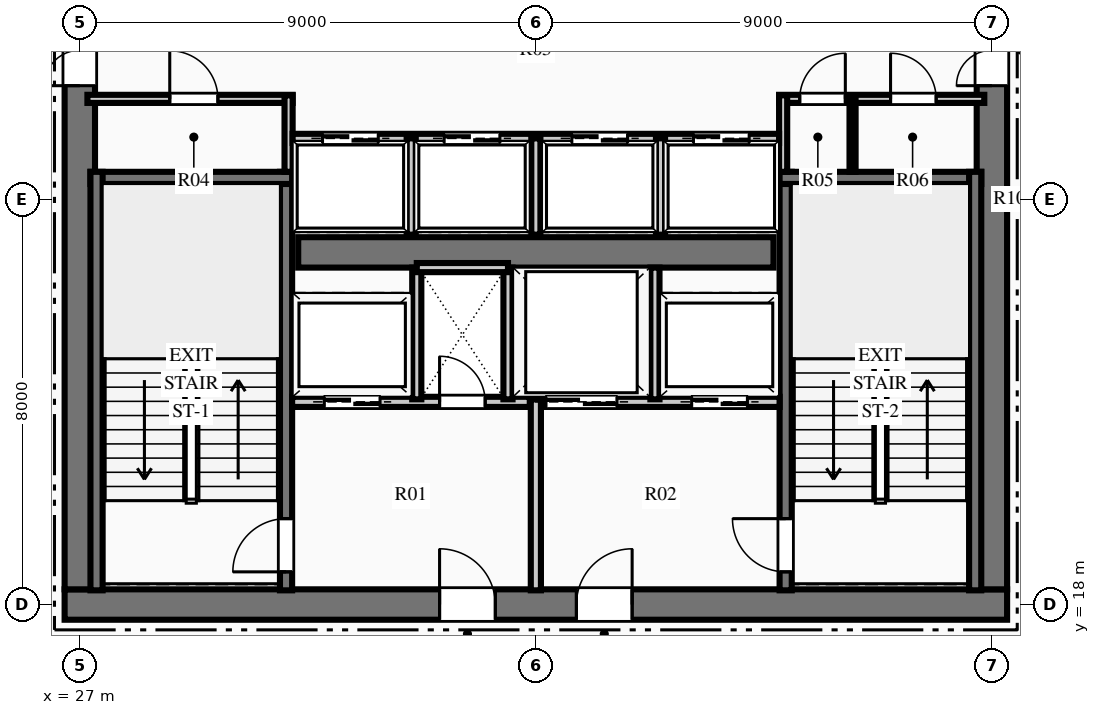
"""IFC4 building model, lengths in metres.
Left out: names, types, materials, properties, quantities, classifications, styles, units other than length and angle.
Written with IfcOpenShell. Run it as: python <this file> out.ifc"""

import sys

from ifc_helpers import new_model, si_unit, direction, frame, frame_2d, origin, place, context, subcontext, project, spatial, rectangle, extrude, element, fill, save


model = new_model("IFC4")
c1 = context("Model", 3, precision=1e-05, world=origin(), true_north=direction((0.0, 1.0)))
c2 = subcontext(c1, "Body", "Model", "MODEL_VIEW")
j1 = project(units=[si_unit("LENGTHUNIT", "METRE"), si_unit("PLANEANGLEUNIT", "RADIAN")], contexts=[c1])
p1 = place(None, origin())
s1 = spatial("IfcSite", under=j1, at=p1, CompositionType="ELEMENT")
p2 = place(p1, origin())
s2 = spatial("IfcBuilding", under=s1, at=p2, CompositionType="ELEMENT")
p3 = place(p2, frame((0.0, 0.0, 55.2)))
s3 = spatial("IfcBuildingStorey", under=s2, at=p3, CompositionType="ELEMENT", Elevation=55.2)
p4 = place(p3, frame((26.7, 18.0, 0.0), z_axis=(0.0, 0.0, 1.0), x_axis=(1.0, 0.0, 0.0)))
e1 = element("IfcWall", 1, at=p4, inside=s3, PredefinedType="SHEAR", context=c2, shape_type="SweptSolid", body=[
    extrude(rectangle(XDim=18.6, YDim=0.6, at=frame_2d((9.3, 0.0))), origin(), (0.0, 0.0, 1.0), 3.75),
])
p5 = place(p4, frame((7.4, 0.0, 0.0)))
e2 = element("IfcOpeningElement", 2, at=p5, cuts=e1, PredefinedType="OPENING", context=c2, shape_type="SweptSolid", body=[
    extrude(rectangle(XDim=1.1, YDim=2.15, at=frame_2d((0.55, 1.075))), frame((0.0, 0.31, 0.0), z_axis=(0.0, -1.0, 0.0), x_axis=(1.0, 0.0, 0.0)), (0.0, 0.0, 1.0), 0.62),
])
p6 = place(p4, frame((10.1, 0.0, 0.0)))
e3 = element("IfcOpeningElement", 3, at=p6, cuts=e1, PredefinedType="OPENING", context=c2, shape_type="SweptSolid", body=[
    extrude(rectangle(XDim=1.1, YDim=2.15, at=frame_2d((0.55, 1.075))), frame((0.0, 0.31, 0.0), z_axis=(0.0, -1.0, 0.0), x_axis=(1.0, 0.0, 0.0)), (0.0, 0.0, 1.0), 0.62),
])
p7 = place(p3, frame((27.0, 18.3, 0.0), z_axis=(0.0, 0.0, 1.0), x_axis=(0.0, 1.0, 0.0)))
e4 = element("IfcWall", 4, at=p7, inside=s3, PredefinedType="SHEAR", context=c2, shape_type="SweptSolid", body=[
    extrude(rectangle(XDim=15.4, YDim=0.6, at=frame_2d((7.7, 0.0))), origin(), (0.0, 0.0, 1.0), 3.75),
])
p8 = place(p7, frame((9.94, 0.0, 0.0)))
e5 = element("IfcOpeningElement", 5, at=p8, cuts=e4, PredefinedType="OPENING", context=c2, shape_type="SweptSolid", body=[
    extrude(rectangle(XDim=1.4, YDim=2.2, at=frame_2d((0.7, 1.1))), frame((0.0, 0.31, 0.0), z_axis=(0.0, -1.0, 0.0), x_axis=(1.0, 0.0, 0.0)), (0.0, 0.0, 1.0), 0.62),
])
p9 = place(p3, frame((45.0, 18.3, 0.0), z_axis=(0.0, 0.0, 1.0), x_axis=(0.0, 1.0, 0.0)))
e6 = element("IfcWall", 6, at=p9, inside=s3, PredefinedType="SHEAR", context=c2, shape_type="SweptSolid", body=[
    extrude(rectangle(XDim=15.4, YDim=0.6, at=frame_2d((7.7, 0.0))), origin(), (0.0, 0.0, 1.0), 3.75),
])
p10 = place(p9, frame((9.94, 0.0, 0.0)))
e7 = element("IfcOpeningElement", 7, at=p10, cuts=e6, PredefinedType="OPENING", context=c2, shape_type="SweptSolid", body=[
    extrude(rectangle(XDim=1.4, YDim=2.2, at=frame_2d((0.7, 1.1))), frame((0.0, 0.31, 0.0), z_axis=(0.0, -1.0, 0.0), x_axis=(1.0, 0.0, 0.0)), (0.0, 0.0, 1.0), 0.62),
])
p11 = place(p3, frame((31.31, 24.95, 0.0), z_axis=(0.0, 0.0, 1.0), x_axis=(1.0, 0.0, 0.0)))
e8 = element("IfcWall", 8, at=p11, inside=s3, PredefinedType="SHEAR", context=c2, shape_type="SweptSolid", body=[
    extrude(rectangle(XDim=9.38, YDim=0.6, at=frame_2d((4.69, 0.0))), origin(), (0.0, 0.0, 1.0), 3.75),
])
p12 = place(p3, frame((31.07, 18.28, 0.0), z_axis=(0.0, 0.0, 1.0), x_axis=(0.0, 1.0, 0.0)))
e9 = element("IfcWall", 9, at=p12, inside=s3, PredefinedType="SHEAR", context=c2, shape_type="SweptSolid", body=[
    extrude(rectangle(XDim=8.26, YDim=0.24, at=frame_2d((4.13, 0.0))), origin(), (0.0, 0.0, 1.0), 3.75),
])
p13 = place(p12, frame((0.365, 0.0, 0.0)))
e10 = element("IfcOpeningElement", 10, at=p13, cuts=e9, PredefinedType="OPENING", context=c2, shape_type="SweptSolid", body=[
    extrude(rectangle(XDim=1.05, YDim=2.15, at=frame_2d((0.525, 1.075))), frame((0.0, 0.13, 0.0), z_axis=(0.0, -1.0, 0.0), x_axis=(1.0, 0.0, 0.0)), (0.0, 0.0, 1.0), 0.26),
])
p14 = place(p3, frame((27.21, 26.42, 0.0), z_axis=(0.0, 0.0, 1.0), x_axis=(1.0, 0.0, 0.0)))
e11 = element("IfcWall", 11, at=p14, inside=s3, PredefinedType="SHEAR", context=c2, shape_type="SweptSolid", body=[
    extrude(rectangle(XDim=3.98, YDim=0.24, at=frame_2d((1.99, 0.0))), origin(), (0.0, 0.0, 1.0), 3.75),
])
p15 = place(p3, frame((27.33, 18.28, 0.0), z_axis=(0.0, 0.0, 1.0), x_axis=(0.0, 1.0, 0.0)))
e12 = element("IfcWall", 12, at=p15, inside=s3, PredefinedType="SHEAR", context=c2, shape_type="SweptSolid", body=[
    extrude(rectangle(XDim=8.26, YDim=0.24, at=frame_2d((4.13, 0.0))), origin(), (0.0, 0.0, 1.0), 3.75),
])
p16 = place(p3, frame((40.93, 18.28, 0.0), z_axis=(0.0, 0.0, 1.0), x_axis=(0.0, 1.0, 0.0)))
e13 = element("IfcWall", 13, at=p16, inside=s3, PredefinedType="SHEAR", context=c2, shape_type="SweptSolid", body=[
    extrude(rectangle(XDim=8.26, YDim=0.24, at=frame_2d((4.13, 0.0))), origin(), (0.0, 0.0, 1.0), 3.75),
])
p17 = place(p16, frame((0.365, 0.0, 0.0)))
e14 = element("IfcOpeningElement", 14, at=p17, cuts=e13, PredefinedType="OPENING", context=c2, shape_type="SweptSolid", body=[
    extrude(rectangle(XDim=1.05, YDim=2.15, at=frame_2d((0.525, 1.075))), frame((0.0, 0.13, 0.0), z_axis=(0.0, -1.0, 0.0), x_axis=(1.0, 0.0, 0.0)), (0.0, 0.0, 1.0), 0.26),
])
p18 = place(p3, frame((40.81, 26.42, 0.0), z_axis=(0.0, 0.0, 1.0), x_axis=(1.0, 0.0, 0.0)))
e15 = element("IfcWall", 15, at=p18, inside=s3, PredefinedType="SHEAR", context=c2, shape_type="SweptSolid", body=[
    extrude(rectangle(XDim=3.98, YDim=0.24, at=frame_2d((1.99, 0.0))), origin(), (0.0, 0.0, 1.0), 3.75),
])
p19 = place(p3, frame((44.67, 18.28, 0.0), z_axis=(0.0, 0.0, 1.0), x_axis=(0.0, 1.0, 0.0)))
e16 = element("IfcWall", 16, at=p19, inside=s3, PredefinedType="SHEAR", context=c2, shape_type="SweptSolid", body=[
    extrude(rectangle(XDim=8.26, YDim=0.24, at=frame_2d((4.13, 0.0))), origin(), (0.0, 0.0, 1.0), 3.75),
])
p20 = place(p3, frame((36.0, 18.28, 0.0), z_axis=(0.0, 0.0, 1.0), x_axis=(0.0, 1.0, 0.0)))
e17 = element("IfcWall", 17, at=p20, inside=s3, PredefinedType="PARTITIONING", context=c2, shape_type="SweptSolid", body=[
    extrude(rectangle(XDim=3.77, YDim=0.2, at=frame_2d((1.885, 0.0))), origin(), (0.0, 0.0, 1.0), 3.44),
])
p21 = place(p3, frame((31.19, 22.0, 0.0), z_axis=(0.0, 0.0, 1.0), x_axis=(1.0, 0.0, 0.0)))
e18 = element("IfcWall", 18, at=p21, inside=s3, PredefinedType="PARTITIONING", context=c2, shape_type="SweptSolid", body=[
    extrude(rectangle(XDim=4.69, YDim=0.2, at=frame_2d((2.345, 0.0))), origin(), (0.0, 0.0, 1.0), 3.44),
])
p22 = place(p21, frame((2.91, 0.0, 0.0)))
e19 = element("IfcOpeningElement", 19, at=p22, cuts=e18, PredefinedType="OPENING", context=c2, shape_type="SweptSolid", body=[
    extrude(rectangle(XDim=0.9, YDim=2.15, at=frame_2d((0.45, 1.075))), frame((0.0, 0.11, 0.0), z_axis=(0.0, -1.0, 0.0), x_axis=(1.0, 0.0, 0.0)), (0.0, 0.0, 1.0), 0.22),
])
p23 = place(p21, frame((0.635, 0.0, 0.0)))
e20 = element("IfcOpeningElement", 20, at=p23, cuts=e18, PredefinedType="OPENING", context=c2, shape_type="SweptSolid", body=[
    extrude(rectangle(XDim=1.1, YDim=2.15, at=frame_2d((0.55, 1.075))), frame((0.0, 0.11, 0.0), z_axis=(0.0, -1.0, 0.0), x_axis=(1.0, 0.0, 0.0)), (0.0, 0.0, 1.0), 0.22),
])
p24 = place(p3, frame((36.12, 22.0, 0.0), z_axis=(0.0, 0.0, 1.0), x_axis=(1.0, 0.0, 0.0)))
e21 = element("IfcWall", 21, at=p24, inside=s3, PredefinedType="PARTITIONING", context=c2, shape_type="SweptSolid", body=[
    extrude(rectangle(XDim=4.69, YDim=0.2, at=frame_2d((2.345, 0.0))), origin(), (0.0, 0.0, 1.0), 3.44),
])
p25 = place(p24, frame((2.955, 0.0, 0.0)))
e22 = element("IfcOpeningElement", 22, at=p25, cuts=e21, PredefinedType="OPENING", context=c2, shape_type="SweptSolid", body=[
    extrude(rectangle(XDim=1.1, YDim=2.15, at=frame_2d((0.55, 1.075))), frame((0.0, 0.11, 0.0), z_axis=(0.0, -1.0, 0.0), x_axis=(1.0, 0.0, 0.0)), (0.0, 0.0, 1.0), 0.22),
])
p26 = place(p24, frame((0.08, 0.0, 0.0)))
e23 = element("IfcOpeningElement", 23, at=p26, cuts=e21, PredefinedType="OPENING", context=c2, shape_type="SweptSolid", body=[
    extrude(rectangle(XDim=1.4, YDim=2.2, at=frame_2d((0.7, 1.1))), frame((0.0, 0.11, 0.0), z_axis=(0.0, -1.0, 0.0), x_axis=(1.0, 0.0, 0.0)), (0.0, 0.0, 1.0), 0.22),
])
for number, where, z_axis, x_axis in (
    (24, (33.65, 22.05, 0.0), (0.0, 0.0, 1.0), (0.0, 1.0, 0.0)),
    (25, (35.45, 22.05, 0.0), (0.0, 0.0, 1.0), (0.0, 1.0, 0.0)),
):
    element("IfcWall", number, at=place(p3, frame(where, z_axis=z_axis, x_axis=x_axis)), inside=s3, PredefinedType="PARTITIONING", context=c2, shape_type="SweptSolid", body=[
        extrude(rectangle(XDim=2.6, YDim=0.18, at=frame_2d((1.3, 0.0))), origin(), (0.0, 0.0, 1.0), 3.44),
    ])
p27 = place(p3, frame((33.65, 24.65, 0.0), z_axis=(0.0, 0.0, 1.0), x_axis=(1.0, 0.0, 0.0)))
e26 = element("IfcWall", 26, at=p27, inside=s3, PredefinedType="PARTITIONING", context=c2, shape_type="SweptSolid", body=[
    extrude(rectangle(XDim=1.8, YDim=0.18, at=frame_2d((0.9, 0.0))), origin(), (0.0, 0.0, 1.0), 3.44),
])
p28 = place(p3, frame((38.35, 22.05, 0.0), z_axis=(0.0, 0.0, 1.0), x_axis=(0.0, 1.0, 0.0)))
e27 = element("IfcWall", 27, at=p28, inside=s3, PredefinedType="PARTITIONING", context=c2, shape_type="SweptSolid", body=[
    extrude(rectangle(XDim=2.6, YDim=0.18, at=frame_2d((1.3, 0.0))), origin(), (0.0, 0.0, 1.0), 3.44),
])
p29 = place(p3, frame((27.15, 27.98, 0.0), z_axis=(0.0, 0.0, 1.0), x_axis=(1.0, 0.0, 0.0)))
e28 = element("IfcWall", 28, at=p29, inside=s3, PredefinedType="PARTITIONING", context=c2, shape_type="SweptSolid", body=[
    extrude(rectangle(XDim=4.05, YDim=0.16, at=frame_2d((2.025, 0.0))), origin(), (0.0, 0.0, 1.0), 3.44),
])
p30 = place(p29, frame((1.625, 0.0, 0.0)))
e29 = element("IfcOpeningElement", 29, at=p30, cuts=e28, PredefinedType="OPENING", context=c2, shape_type="SweptSolid", body=[
    extrude(rectangle(XDim=0.95, YDim=2.15, at=frame_2d((0.475, 1.075))), frame((0.0, 0.09, 0.0), z_axis=(0.0, -1.0, 0.0), x_axis=(1.0, 0.0, 0.0)), (0.0, 0.0, 1.0), 0.18),
])
p31 = place(p3, frame((31.12, 26.54, 0.0), z_axis=(0.0, 0.0, 1.0), x_axis=(0.0, 1.0, 0.0)))
e30 = element("IfcWall", 30, at=p31, inside=s3, PredefinedType="PARTITIONING", context=c2, shape_type="SweptSolid", body=[
    extrude(rectangle(XDim=1.51, YDim=0.16, at=frame_2d((0.755, 0.0))), origin(), (0.0, 0.0, 1.0), 3.44),
])
p32 = place(p3, frame((40.8, 27.98, 0.0), z_axis=(0.0, 0.0, 1.0), x_axis=(1.0, 0.0, 0.0)))
e31 = element("IfcWall", 31, at=p32, inside=s3, PredefinedType="PARTITIONING", context=c2, shape_type="SweptSolid", body=[
    extrude(rectangle(XDim=4.05, YDim=0.16, at=frame_2d((2.025, 0.0))), origin(), (0.0, 0.0, 1.0), 3.44),
])
p33 = place(p32, frame((0.407, 0.0, 0.0)))
e32 = element("IfcOpeningElement", 32, at=p33, cuts=e31, PredefinedType="OPENING", context=c2, shape_type="SweptSolid", body=[
    extrude(rectangle(XDim=0.9, YDim=2.15, at=frame_2d((0.45, 1.075))), frame((0.0, 0.09, 0.0), z_axis=(0.0, -1.0, 0.0), x_axis=(1.0, 0.0, 0.0)), (0.0, 0.0, 1.0), 0.18),
])
p34 = place(p32, frame((2.2, 0.0, 0.0)))
e33 = element("IfcOpeningElement", 33, at=p34, cuts=e31, PredefinedType="OPENING", context=c2, shape_type="SweptSolid", body=[
    extrude(rectangle(XDim=0.9, YDim=2.15, at=frame_2d((0.45, 1.075))), frame((0.0, 0.09, 0.0), z_axis=(0.0, -1.0, 0.0), x_axis=(1.0, 0.0, 0.0)), (0.0, 0.0, 1.0), 0.18),
])
p35 = place(p3, frame((40.88, 26.54, 0.0), z_axis=(0.0, 0.0, 1.0), x_axis=(0.0, 1.0, 0.0)))
e34 = element("IfcWall", 34, at=p35, inside=s3, PredefinedType="PARTITIONING", context=c2, shape_type="SweptSolid", body=[
    extrude(rectangle(XDim=1.51, YDim=0.16, at=frame_2d((0.755, 0.0))), origin(), (0.0, 0.0, 1.0), 3.44),
])
p36 = place(p3, frame((42.25, 26.54, 0.0), z_axis=(0.0, 0.0, 1.0), x_axis=(0.0, 1.0, 0.0)))
e35 = element("IfcWall", 35, at=p36, inside=s3, PredefinedType="PARTITIONING", context=c2, shape_type="SweptSolid", body=[
    extrude(rectangle(XDim=1.44, YDim=0.12, at=frame_2d((0.72, 0.0))), origin(), (0.0, 0.0, 1.0), 3.44),
])
p37 = place(p3, frame((31.2, 27.2, 0.0), z_axis=(0.0, 0.0, 1.0), x_axis=(1.0, 0.0, 0.0)))
e36 = element("IfcWall", 36, at=p37, inside=s3, PredefinedType="PARTITIONING", context=c2, shape_type="SweptSolid", body=[
    extrude(rectangle(XDim=9.6, YDim=0.18, at=frame_2d((4.8, 0.0))), origin(), (0.0, 0.0, 1.0), 3.44),
])
p38 = place(p37, frame((0.59, 0.0, 0.0)))
e37 = element("IfcOpeningElement", 37, at=p38, cuts=e36, PredefinedType="OPENING", context=c2, shape_type="SweptSolid", body=[
    extrude(rectangle(XDim=1.1, YDim=2.15, at=frame_2d((0.55, 1.075))), frame((0.0, 0.1, 0.0), z_axis=(0.0, -1.0, 0.0), x_axis=(1.0, 0.0, 0.0)), (0.0, 0.0, 1.0), 0.2),
])
p39 = place(p37, frame((2.99, 0.0, 0.0)))
e38 = element("IfcOpeningElement", 38, at=p39, cuts=e36, PredefinedType="OPENING", context=c2, shape_type="SweptSolid", body=[
    extrude(rectangle(XDim=1.1, YDim=2.15, at=frame_2d((0.55, 1.075))), frame((0.0, 0.1, 0.0), z_axis=(0.0, -1.0, 0.0), x_axis=(1.0, 0.0, 0.0)), (0.0, 0.0, 1.0), 0.2),
])
p40 = place(p37, frame((5.51, 0.0, 0.0)))
e39 = element("IfcOpeningElement", 39, at=p40, cuts=e36, PredefinedType="OPENING", context=c2, shape_type="SweptSolid", body=[
    extrude(rectangle(XDim=1.1, YDim=2.15, at=frame_2d((0.55, 1.075))), frame((0.0, 0.1, 0.0), z_axis=(0.0, -1.0, 0.0), x_axis=(1.0, 0.0, 0.0)), (0.0, 0.0, 1.0), 0.2),
])
p41 = place(p37, frame((7.91, 0.0, 0.0)))
e40 = element("IfcOpeningElement", 40, at=p41, cuts=e36, PredefinedType="OPENING", context=c2, shape_type="SweptSolid", body=[
    extrude(rectangle(XDim=1.1, YDim=2.15, at=frame_2d((0.55, 1.075))), frame((0.0, 0.1, 0.0), z_axis=(0.0, -1.0, 0.0), x_axis=(1.0, 0.0, 0.0)), (0.0, 0.0, 1.0), 0.2),
])
for number, where, z_axis, x_axis in (
    (41, (33.54, 25.3, 0.0), (0.0, 0.0, 1.0), (0.0, 1.0, 0.0)),
    (42, (36.0, 25.3, 0.0), (0.0, 0.0, 1.0), (0.0, 1.0, 0.0)),
    (43, (38.46, 25.3, 0.0), (0.0, 0.0, 1.0), (0.0, 1.0, 0.0)),
):
    element("IfcWall", number, at=place(p3, frame(where, z_axis=z_axis, x_axis=x_axis)), inside=s3, PredefinedType="PARTITIONING", context=c2, shape_type="SweptSolid", body=[
        extrude(rectangle(XDim=1.9, YDim=0.18, at=frame_2d((0.95, 0.0))), origin(), (0.0, 0.0, 1.0), 3.44),
    ])
p42 = place(p30, origin())
e44 = element("IfcDoor", 44, at=p42, inside=s3, OperationType="SINGLE_SWING_LEFT", PredefinedType="DOOR", context=c2, shape_type="SweptSolid", body=[
    extrude(rectangle(XDim=0.95, YDim=2.15, at=frame_2d((0.475, 1.075))), frame((0.0, 0.025, 0.0), z_axis=(0.0, -1.0, 0.0), x_axis=(1.0, 0.0, 0.0)), (0.0, 0.0, 1.0), 0.05),
])
fill(e29, e44)
p43 = place(p33, origin())
e45 = element("IfcDoor", 45, at=p43, inside=s3, OperationType="SINGLE_SWING_RIGHT", PredefinedType="DOOR", context=c2, shape_type="SweptSolid", body=[
    extrude(rectangle(XDim=0.9, YDim=2.15, at=frame_2d((0.45, 1.075))), frame((0.0, 0.025, 0.0), z_axis=(0.0, -1.0, 0.0), x_axis=(1.0, 0.0, 0.0)), (0.0, 0.0, 1.0), 0.05),
])
fill(e32, e45)
p44 = place(p34, origin())
e46 = element("IfcDoor", 46, at=p44, inside=s3, OperationType="SINGLE_SWING_LEFT", PredefinedType="DOOR", context=c2, shape_type="SweptSolid", body=[
    extrude(rectangle(XDim=0.9, YDim=2.15, at=frame_2d((0.45, 1.075))), frame((0.0, 0.025, 0.0), z_axis=(0.0, -1.0, 0.0), x_axis=(1.0, 0.0, 0.0)), (0.0, 0.0, 1.0), 0.05),
])
fill(e33, e46)
p45 = place(p13, origin())
e47 = element("IfcDoor", 47, at=p45, inside=s3, OperationType="SINGLE_SWING_LEFT", PredefinedType="DOOR", context=c2, shape_type="SweptSolid", body=[
    extrude(rectangle(XDim=1.05, YDim=2.15, at=frame_2d((0.525, 1.075))), frame((0.0, 0.025, 0.0), z_axis=(0.0, -1.0, 0.0), x_axis=(1.0, 0.0, 0.0)), (0.0, 0.0, 1.0), 0.05),
])
fill(e10, e47)
p46 = place(p17, origin())
e48 = element("IfcDoor", 48, at=p46, inside=s3, OperationType="SINGLE_SWING_RIGHT", PredefinedType="DOOR", context=c2, shape_type="SweptSolid", body=[
    extrude(rectangle(XDim=1.05, YDim=2.15, at=frame_2d((0.525, 1.075))), frame((0.0, 0.025, 0.0), z_axis=(0.0, -1.0, 0.0), x_axis=(1.0, 0.0, 0.0)), (0.0, 0.0, 1.0), 0.05),
])
fill(e14, e48)
p47 = place(p5, origin())
e49 = element("IfcDoor", 49, at=p47, inside=s3, OperationType="SINGLE_SWING_LEFT", PredefinedType="DOOR", context=c2, shape_type="SweptSolid", body=[
    extrude(rectangle(XDim=1.1, YDim=2.15, at=frame_2d((0.55, 1.075))), frame((0.0, 0.025, 0.0), z_axis=(0.0, -1.0, 0.0), x_axis=(1.0, 0.0, 0.0)), (0.0, 0.0, 1.0), 0.05),
])
fill(e2, e49)
p48 = place(p6, origin())
e50 = element("IfcDoor", 50, at=p48, inside=s3, OperationType="SINGLE_SWING_RIGHT", PredefinedType="DOOR", context=c2, shape_type="SweptSolid", body=[
    extrude(rectangle(XDim=1.1, YDim=2.15, at=frame_2d((0.55, 1.075))), frame((0.0, 0.025, 0.0), z_axis=(0.0, -1.0, 0.0), x_axis=(1.0, 0.0, 0.0)), (0.0, 0.0, 1.0), 0.05),
])
fill(e3, e50)
p49 = place(p22, origin())
e51 = element("IfcDoor", 51, at=p49, inside=s3, OperationType="SINGLE_SWING_LEFT", PredefinedType="DOOR", context=c2, shape_type="SweptSolid", body=[
    extrude(rectangle(XDim=0.9, YDim=2.15, at=frame_2d((0.45, 1.075))), frame((0.0, 0.025, 0.0), z_axis=(0.0, -1.0, 0.0), x_axis=(1.0, 0.0, 0.0)), (0.0, 0.0, 1.0), 0.05),
])
fill(e19, e51)
p50 = place(p8, origin())
e52 = element("IfcDoor", 52, at=p50, inside=s3, OperationType="DOUBLE_DOOR_SINGLE_SWING", PredefinedType="DOOR", context=c2, shape_type="SweptSolid", body=[
    extrude(rectangle(XDim=1.4, YDim=2.2, at=frame_2d((0.7, 1.1))), frame((0.0, 0.025, 0.0), z_axis=(0.0, -1.0, 0.0), x_axis=(1.0, 0.0, 0.0)), (0.0, 0.0, 1.0), 0.05),
])
fill(e5, e52)
p51 = place(p10, origin())
e53 = element("IfcDoor", 53, at=p51, inside=s3, OperationType="DOUBLE_DOOR_SINGLE_SWING", PredefinedType="DOOR", context=c2, shape_type="SweptSolid", body=[
    extrude(rectangle(XDim=1.4, YDim=2.2, at=frame_2d((0.7, 1.1))), frame((0.0, 0.025, 0.0), z_axis=(0.0, -1.0, 0.0), x_axis=(1.0, 0.0, 0.0)), (0.0, 0.0, 1.0), 0.05),
])
fill(e7, e53)
p52 = place(p38, origin())
e54 = element("IfcDoor", 54, at=p52, inside=s3, OperationType="SLIDING_TO_LEFT", PredefinedType="DOOR", context=c2, shape_type="SweptSolid", body=[
    extrude(rectangle(XDim=1.1, YDim=2.15, at=frame_2d((0.55, 1.075))), frame((0.0, 0.025, 0.0), z_axis=(0.0, -1.0, 0.0), x_axis=(1.0, 0.0, 0.0)), (0.0, 0.0, 1.0), 0.05),
])
fill(e37, e54)
p53 = place(p39, origin())
e55 = element("IfcDoor", 55, at=p53, inside=s3, OperationType="SLIDING_TO_LEFT", PredefinedType="DOOR", context=c2, shape_type="SweptSolid", body=[
    extrude(rectangle(XDim=1.1, YDim=2.15, at=frame_2d((0.55, 1.075))), frame((0.0, 0.025, 0.0), z_axis=(0.0, -1.0, 0.0), x_axis=(1.0, 0.0, 0.0)), (0.0, 0.0, 1.0), 0.05),
])
fill(e38, e55)
p54 = place(p40, origin())
e56 = element("IfcDoor", 56, at=p54, inside=s3, OperationType="SLIDING_TO_LEFT", PredefinedType="DOOR", context=c2, shape_type="SweptSolid", body=[
    extrude(rectangle(XDim=1.1, YDim=2.15, at=frame_2d((0.55, 1.075))), frame((0.0, 0.025, 0.0), z_axis=(0.0, -1.0, 0.0), x_axis=(1.0, 0.0, 0.0)), (0.0, 0.0, 1.0), 0.05),
])
fill(e39, e56)
p55 = place(p41, origin())
e57 = element("IfcDoor", 57, at=p55, inside=s3, OperationType="SLIDING_TO_LEFT", PredefinedType="DOOR", context=c2, shape_type="SweptSolid", body=[
    extrude(rectangle(XDim=1.1, YDim=2.15, at=frame_2d((0.55, 1.075))), frame((0.0, 0.025, 0.0), z_axis=(0.0, -1.0, 0.0), x_axis=(1.0, 0.0, 0.0)), (0.0, 0.0, 1.0), 0.05),
])
fill(e40, e57)
p56 = place(p23, origin())
e58 = element("IfcDoor", 58, at=p56, inside=s3, OperationType="SLIDING_TO_LEFT", PredefinedType="DOOR", context=c2, shape_type="SweptSolid", body=[
    extrude(rectangle(XDim=1.1, YDim=2.15, at=frame_2d((0.55, 1.075))), frame((0.0, 0.025, 0.0), z_axis=(0.0, -1.0, 0.0), x_axis=(1.0, 0.0, 0.0)), (0.0, 0.0, 1.0), 0.05),
])
fill(e20, e58)
p57 = place(p25, origin())
e59 = element("IfcDoor", 59, at=p57, inside=s3, OperationType="SLIDING_TO_LEFT", PredefinedType="DOOR", context=c2, shape_type="SweptSolid", body=[
    extrude(rectangle(XDim=1.1, YDim=2.15, at=frame_2d((0.55, 1.075))), frame((0.0, 0.025, 0.0), z_axis=(0.0, -1.0, 0.0), x_axis=(1.0, 0.0, 0.0)), (0.0, 0.0, 1.0), 0.05),
])
fill(e22, e59)
p58 = place(p26, origin())
e60 = element("IfcDoor", 60, at=p58, inside=s3, OperationType="SLIDING_TO_LEFT", PredefinedType="DOOR", context=c2, shape_type="SweptSolid", body=[
    extrude(rectangle(XDim=1.4, YDim=2.2, at=frame_2d((0.7, 1.1))), frame((0.0, 0.025, 0.0), z_axis=(0.0, -1.0, 0.0), x_axis=(1.0, 0.0, 0.0)), (0.0, 0.0, 1.0), 0.05),
])
fill(e23, e60)
save(model, sys.argv[1])
